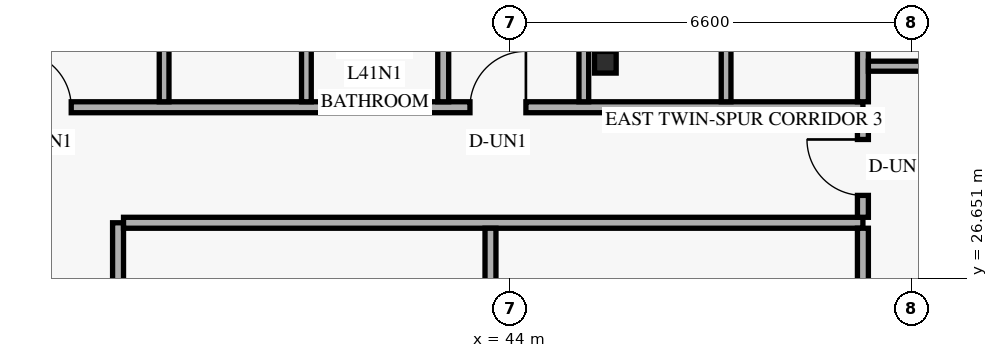
"""IFC4 building model, lengths in metres.
Left out: names, types, materials, properties, quantities, classifications, styles, units other than length and angle.
Written with IfcOpenShell. Run it as: python <this file> out.ifc"""

import sys

from ifc_helpers import new_model, si_unit, direction, frame, frame_2d, origin, origin_2d, place, context, subcontext, project, spatial, rectangle, hollow_rectangle, extrude, element, fill, save


model = new_model("IFC4")
c1 = context("Model", 3, precision=1e-05, world=origin(), true_north=direction((0.0, 1.0)))
c2 = subcontext(c1, "Body", "Model", "MODEL_VIEW")
j1 = project(units=[si_unit("LENGTHUNIT", "METRE"), si_unit("PLANEANGLEUNIT", "RADIAN")], contexts=[c1])
p1 = place(None, origin())
s1 = spatial("IfcSite", under=j1, at=p1, CompositionType="ELEMENT")
p2 = place(p1, origin())
s2 = spatial("IfcBuilding", under=s1, at=p2, CompositionType="ELEMENT")
p3 = place(p2, frame((0.0, 0.0, 159.0)))
s3 = spatial("IfcBuildingStorey", under=s2, at=p3, CompositionType="ELEMENT", Elevation=159.0)
p4 = place(p3, frame((45.501, 30.2, 0.0), z_axis=(0.034971136209, 0.0, 0.999388322742), x_axis=(0.0, 1.0, 0.0)))
e1 = element("IfcColumn", 1, at=p4, inside=s3, PredefinedType="COLUMN", context=c2, shape_type="SweptSolid", body=[
    extrude(hollow_rectangle(XDim=0.356, YDim=0.356, WallThickness=0.016, at=origin_2d()), origin(), (0.0, 0.0, 1.0), 3.602),
])
p5 = place(p3, frame((37.55, 17.28, 0.0), z_axis=(0.0, 0.0, 1.0), x_axis=(0.0, 1.0, 0.0)))
e2 = element("IfcWall", 2, at=p5, inside=s3, PredefinedType="STANDARD", context=c2, shape_type="SweptSolid", body=[
    extrude(rectangle(XDim=10.28, YDim=0.18, at=frame_2d((5.14, 0.0))), origin(), (0.0, 0.0, 1.0), 2.73),
])
p6 = place(p5, frame((0.793, 0.0, 0.0)))
e3 = element("IfcOpeningElement", 3, at=p6, cuts=e2, PredefinedType="OPENING", context=c2, shape_type="SweptSolid", body=[
    extrude(rectangle(XDim=0.92, YDim=2.15, at=frame_2d((0.46, 1.075))), frame((0.0, 0.1, 0.0), z_axis=(0.0, -1.0, 0.0), x_axis=(1.0, 0.0, 0.0)), (0.0, 0.0, 1.0), 0.2),
])
p7 = place(p3, frame((37.64, 27.56, 0.0), z_axis=(0.0, 0.0, 1.0), x_axis=(1.0, 0.0, 0.0)))
e4 = element("IfcWall", 4, at=p7, inside=s3, PredefinedType="STANDARD", context=c2, shape_type="SweptSolid", body=[
    extrude(rectangle(XDim=12.16, YDim=0.18, at=frame_2d((6.08, 0.0))), origin(), (0.0, 0.0, 1.0), 2.73),
])
p8 = place(p3, frame((35.51, 29.46, 0.0), z_axis=(0.0, 0.0, 1.0), x_axis=(1.0, 0.0, 0.0)))
e5 = element("IfcWall", 5, at=p8, inside=s3, PredefinedType="STANDARD", context=c2, shape_type="SweptSolid", body=[
    extrude(rectangle(XDim=14.29, YDim=0.18, at=frame_2d((7.145, 0.0))), origin(), (0.0, 0.0, 1.0), 2.73),
])
p9 = place(p8, frame((0.35, 0.0, 0.0)))
e6 = element("IfcOpeningElement", 6, at=p9, cuts=e5, PredefinedType="OPENING", context=c2, shape_type="SweptSolid", body=[
    extrude(rectangle(XDim=0.92, YDim=2.15, at=frame_2d((0.46, 1.075))), frame((0.0, 0.1, 0.0), z_axis=(0.0, -1.0, 0.0), x_axis=(1.0, 0.0, 0.0)), (0.0, 0.0, 1.0), 0.2),
])
p10 = place(p8, frame((7.828, 0.0, 0.0)))
e7 = element("IfcOpeningElement", 7, at=p10, cuts=e5, PredefinedType="OPENING", context=c2, shape_type="SweptSolid", body=[
    extrude(rectangle(XDim=0.92, YDim=2.15, at=frame_2d((0.46, 1.075))), frame((0.0, 0.1, 0.0), z_axis=(0.0, -1.0, 0.0), x_axis=(1.0, 0.0, 0.0)), (0.0, 0.0, 1.0), 0.2),
])
p11 = place(p3, frame((42.898, 29.55, 0.0), z_axis=(0.0, 0.0, 1.0), x_axis=(0.0, 1.0, 0.0)))
e8 = element("IfcWall", 8, at=p11, inside=s3, PredefinedType="PARTITIONING", context=c2, shape_type="SweptSolid", body=[
    extrude(rectangle(XDim=14.17, YDim=0.18, at=frame_2d((7.085, 0.0))), origin(), (0.0, 0.0, 1.0), 2.73),
])
p12 = place(p3, frame((38.308, 29.55, 0.0), z_axis=(0.0, 0.0, 1.0), x_axis=(0.0, 1.0, 0.0)))
e9 = element("IfcWall", 9, at=p12, inside=s3, PredefinedType="PLUMBINGWALL", context=c2, shape_type="SweptSolid", body=[
    extrude(rectangle(XDim=2.43, YDim=0.16, at=frame_2d((1.215, 0.0))), origin(), (0.0, 0.0, 1.0), 2.73),
])
p13 = place(p3, frame((40.648, 29.55, 0.0), z_axis=(0.0, 0.0, 1.0), x_axis=(0.0, 1.0, 0.0)))
e10 = element("IfcWall", 10, at=p13, inside=s3, PredefinedType="PLUMBINGWALL", context=c2, shape_type="SweptSolid", body=[
    extrude(rectangle(XDim=2.27, YDim=0.16, at=frame_2d((1.135, 0.0))), origin(), (0.0, 0.0, 1.0), 2.73),
])
p14 = place(p3, frame((45.21, 29.55, 0.0), z_axis=(0.0, 0.0, 1.0), x_axis=(0.0, 1.0, 0.0)))
e11 = element("IfcWall", 11, at=p14, inside=s3, PredefinedType="PLUMBINGWALL", context=c2, shape_type="SweptSolid", body=[
    extrude(rectangle(XDim=2.76, YDim=0.16, at=frame_2d((1.38, 0.0))), origin(), (0.0, 0.0, 1.0), 2.73),
])
p15 = place(p3, frame((47.55, 29.55, 0.0), z_axis=(0.0, 0.0, 1.0), x_axis=(0.0, 1.0, 0.0)))
e12 = element("IfcWall", 12, at=p15, inside=s3, PredefinedType="PLUMBINGWALL", context=c2, shape_type="SweptSolid", body=[
    extrude(rectangle(XDim=2.6, YDim=0.16, at=frame_2d((1.3, 0.0))), origin(), (0.0, 0.0, 1.0), 2.73),
])
p16 = place(p3, frame((43.675, 17.37, 0.0), z_axis=(0.0, 0.0, 1.0), x_axis=(0.0, 1.0, 0.0)))
e13 = element("IfcWall", 13, at=p16, inside=s3, PredefinedType="PARTITIONING", context=c2, shape_type="SweptSolid", body=[
    extrude(rectangle(XDim=10.1, YDim=0.18, at=frame_2d((5.05, 0.0))), origin(), (0.0, 0.0, 1.0), 2.73),
])
p17 = place(p3, frame((49.8, 27.65, 0.0), z_axis=(0.0, 0.0, 1.0), x_axis=(0.0, 1.0, 0.0)))
e14 = element("IfcWall", 14, at=p17, inside=s3, PredefinedType="STANDARD", context=c2, shape_type="SweptSolid", body=[
    extrude(rectangle(XDim=1.72, YDim=0.18, at=frame_2d((0.86, 0.0))), origin(), (0.0, 0.0, 1.0), 3.36),
])
p18 = place(p17, frame((0.36, 0.0, 0.0)))
e15 = element("IfcOpeningElement", 15, at=p18, cuts=e14, PredefinedType="OPENING", context=c2, shape_type="SweptSolid", body=[
    extrude(rectangle(XDim=0.92, YDim=2.15, at=frame_2d((0.46, 1.075))), frame((0.0, 0.1, 0.0), z_axis=(0.0, -1.0, 0.0), x_axis=(1.0, 0.0, 0.0)), (0.0, 0.0, 1.0), 0.2),
])
p19 = place(p3, frame((49.8, 17.37, 0.0), z_axis=(0.0, 0.0, 1.0), x_axis=(0.0, 1.0, 0.0)))
e16 = element("IfcWall", 16, at=p19, inside=s3, PredefinedType="PARTITIONING", context=c2, shape_type="SweptSolid", body=[
    extrude(rectangle(XDim=10.1, YDim=0.18, at=frame_2d((5.05, 0.0))), origin(), (0.0, 0.0, 1.0), 2.73),
])
p20 = place(p3, frame((49.8, 29.55, 0.0), z_axis=(0.0, 0.0, 1.0), x_axis=(0.0, 1.0, 0.0)))
e17 = element("IfcWall", 17, at=p20, inside=s3, PredefinedType="PARTITIONING", context=c2, shape_type="SweptSolid", body=[
    extrude(rectangle(XDim=14.17, YDim=0.18, at=frame_2d((7.085, 0.0))), origin(), (0.0, 0.0, 1.0), 2.73),
])
p21 = place(p3, frame((49.89, 30.135, 0.0), z_axis=(0.0, 0.0, 1.0), x_axis=(1.0, 0.0, 0.0)))
e18 = element("IfcWall", 18, at=p21, inside=s3, PredefinedType="PARTITIONING", context=c2, shape_type="SweptSolid", body=[
    extrude(rectangle(XDim=8.43, YDim=0.165, at=frame_2d((4.215, 0.0))), origin(), (0.0, 0.0, 1.0), 2.73),
])
p22 = place(p21, frame((4.19, 0.0, 0.0)))
e19 = element("IfcOpeningElement", 19, at=p22, cuts=e18, PredefinedType="OPENING", context=c2, shape_type="SweptSolid", body=[
    extrude(rectangle(XDim=0.95, YDim=2.15, at=frame_2d((0.475, 1.075))), frame((0.0, 0.093, 0.0), z_axis=(0.0, -1.0, 0.0), x_axis=(1.0, 0.0, 0.0)), (0.0, 0.0, 1.0), 0.185),
])
p23 = place(p9, origin())
e20 = element("IfcDoor", 20, at=p23, inside=s3, OperationType="SINGLE_SWING_LEFT", PredefinedType="DOOR", context=c2, shape_type="SweptSolid", body=[
    extrude(rectangle(XDim=0.92, YDim=2.15, at=frame_2d((0.46, 1.075))), frame((0.0, 0.025, 0.0), z_axis=(0.0, -1.0, 0.0), x_axis=(1.0, 0.0, 0.0)), (0.0, 0.0, 1.0), 0.05),
])
fill(e6, e20)
p24 = place(p10, origin())
e21 = element("IfcDoor", 21, at=p24, inside=s3, OperationType="SINGLE_SWING_RIGHT", PredefinedType="DOOR", context=c2, shape_type="SweptSolid", body=[
    extrude(rectangle(XDim=0.92, YDim=2.15, at=frame_2d((0.46, 1.075))), frame((0.0, 0.025, 0.0), z_axis=(0.0, -1.0, 0.0), x_axis=(1.0, 0.0, 0.0)), (0.0, 0.0, 1.0), 0.05),
])
fill(e7, e21)
p25 = place(p18, origin())
e22 = element("IfcDoor", 22, at=p25, inside=s3, OperationType="SINGLE_SWING_RIGHT", PredefinedType="DOOR", context=c2, shape_type="SweptSolid", body=[
    extrude(rectangle(XDim=0.92, YDim=2.15, at=frame_2d((0.46, 1.075))), frame((0.0, 0.025, 0.0), z_axis=(0.0, -1.0, 0.0), x_axis=(1.0, 0.0, 0.0)), (0.0, 0.0, 1.0), 0.05),
])
fill(e15, e22)
save(model, sys.argv[1])
